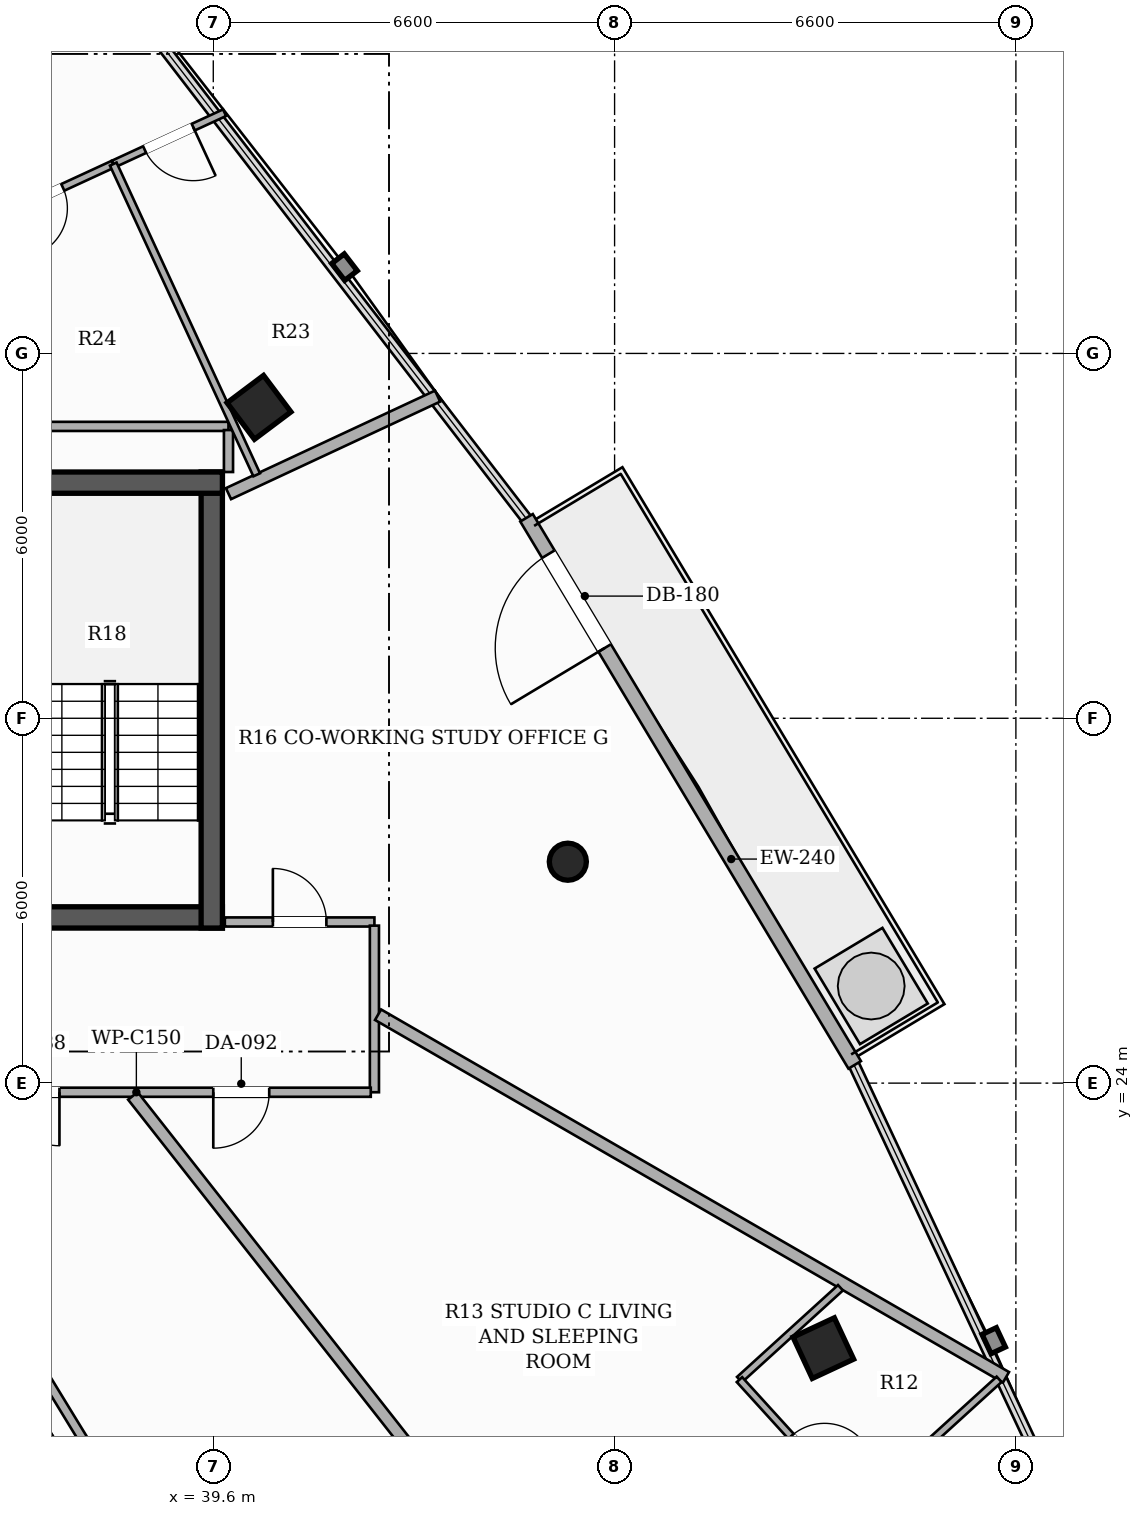
"""IFC4 building model, lengths in metres.
Left out: names, types, materials, properties, quantities, classifications, styles, units other than length and angle.
Written with IfcOpenShell. Run it as: python <this file> out.ifc"""

import sys

from ifc_helpers import new_model, si_unit, direction, frame, frame_2d, origin, origin_2d, place, context, subcontext, project, spatial, rectangle, hollow_rectangle, hollow_circle, extrude, element, fill, save


model = new_model("IFC4")
c1 = context("Model", 3, precision=1e-05, world=origin(), true_north=direction((0.0, 1.0)))
c2 = subcontext(c1, "Body", "Model", "MODEL_VIEW")
j1 = project(units=[si_unit("LENGTHUNIT", "METRE"), si_unit("PLANEANGLEUNIT", "RADIAN")], contexts=[c1])
p1 = place(None, origin())
s1 = spatial("IfcSite", under=j1, at=p1, CompositionType="ELEMENT")
p2 = place(p1, origin())
s2 = spatial("IfcBuilding", under=s1, at=p2, CompositionType="ELEMENT")
p3 = place(p2, frame((0.0, 0.0, 203.0)))
s3 = spatial("IfcBuildingStorey", under=s2, at=p3, CompositionType="ELEMENT", Elevation=203.0)
p4 = place(p3, frame((26.25, 26.725, 0.0), z_axis=(0.0, 0.0, 1.0), x_axis=(1.0, 0.0, 0.0)))
e1 = element("IfcWall", 1, at=p4, inside=s3, PredefinedType="SHEAR", context=c2, shape_type="SweptSolid", body=[
    extrude(rectangle(XDim=13.5, YDim=0.35, at=frame_2d((6.75, 0.0))), origin(), (0.0, 0.0, 1.0), 3.3),
])
p5 = place(p4, frame((4.35, 0.0, 0.0)))
e2 = element("IfcOpeningElement", 2, at=p5, cuts=e1, PredefinedType="OPENING", context=c2, shape_type="SweptSolid", body=[
    extrude(rectangle(XDim=1.05, YDim=2.15, at=frame_2d((0.525, 1.075))), frame((0.0, 0.185, 0.0), z_axis=(0.0, -1.0, 0.0), x_axis=(1.0, 0.0, 0.0)), (0.0, 0.0, 1.0), 0.37),
])
p6 = place(p4, frame((8.3, 0.0, 0.0)))
e3 = element("IfcOpeningElement", 3, at=p6, cuts=e1, PredefinedType="OPENING", context=c2, shape_type="SweptSolid", body=[
    extrude(rectangle(XDim=1.05, YDim=2.15, at=frame_2d((0.525, 1.075))), frame((0.0, 0.185, 0.0), z_axis=(0.0, -1.0, 0.0), x_axis=(1.0, 0.0, 0.0)), (0.0, 0.0, 1.0), 0.37),
])
p7 = place(p3, frame((39.575, 26.55, 0.0), z_axis=(0.0, 0.0, 1.0), x_axis=(0.0, 1.0, 0.0)))
e4 = element("IfcWall", 4, at=p7, inside=s3, PredefinedType="SHEAR", context=c2, shape_type="SweptSolid", body=[
    extrude(rectangle(XDim=7.5, YDim=0.35, at=frame_2d((3.75, 0.0))), origin(), (0.0, 0.0, 1.0), 3.3),
])
p8 = place(p3, frame((36.15, 33.875, 0.0), z_axis=(0.0, 0.0, 1.0), x_axis=(1.0, 0.0, 0.0)))
e5 = element("IfcWall", 5, at=p8, inside=s3, PredefinedType="SHEAR", context=c2, shape_type="SweptSolid", body=[
    extrude(rectangle(XDim=3.6, YDim=0.35, at=frame_2d((1.8, 0.0))), origin(), (0.0, 0.0, 1.0), 3.3),
])
p9 = place(p3, frame((49.633, 19.642, 0.0), z_axis=(0.0, 0.0, 1.0), x_axis=(-0.422618261741, 0.906307787037, 0.0)))
e6 = element("IfcColumn", 6, at=p9, inside=s3, PredefinedType="COLUMN", context=c2, shape_type="SweptSolid", body=[
    extrude(hollow_rectangle(XDim=0.75, YDim=0.75, WallThickness=0.025, at=origin_2d()), origin(), (0.0, 0.0, 1.0), 3.3),
])
p10 = place(p3, frame((45.431, 27.641, 0.0), z_axis=(0.0, 0.0, 1.0), x_axis=(1.0, 0.0, 0.0)))
e7 = element("IfcColumn", 7, at=p10, inside=s3, PredefinedType="COLUMN", context=c2, shape_type="SweptSolid", body=[
    extrude(hollow_circle(Radius=0.305, WallThickness=0.016, at=origin_2d()), origin(), (0.0, 0.0, 1.0), 3.3),
])
p11 = place(p3, frame((40.352, 35.113, 0.0), z_axis=(0.0, 0.0, 1.0), x_axis=(-0.600420225326, 0.799684658487, 0.0)))
e8 = element("IfcColumn", 8, at=p11, inside=s3, PredefinedType="COLUMN", context=c2, shape_type="SweptSolid", body=[
    extrude(hollow_rectangle(XDim=0.75, YDim=0.75, WallThickness=0.025, at=origin_2d()), origin(), (0.0, 0.0, 1.0), 3.3),
])
p12 = place(p3, frame((50.149, 24.3, 0.0), z_axis=(0.0, 0.0, 1.0), x_axis=(-0.514406779101, 0.857546305231, 0.0)))
e9 = element("IfcWall", 9, at=p12, inside=s3, PredefinedType="SOLIDWALL", context=c2, shape_type="SweptSolid", body=[
    extrude(rectangle(XDim=10.492, YDim=0.24, at=frame_2d((5.246, 0.0))), origin(), (0.0, 0.0, 1.0), 2.624),
])
p13 = place(p12, frame((7.994, 0.0, 0.0)))
e10 = element("IfcOpeningElement", 10, at=p13, cuts=e9, PredefinedType="OPENING", context=c2, shape_type="SweptSolid", body=[
    extrude(rectangle(XDim=1.8, YDim=2.2, at=frame_2d((0.9, 1.1))), frame((0.0, 0.13, 0.0), z_axis=(0.0, -1.0, 0.0), x_axis=(1.0, 0.0, 0.0)), (0.0, 0.0, 1.0), 0.26),
])
p14 = place(p3, frame((39.79, 26.65, 0.0), z_axis=(0.0, 0.0, 1.0), x_axis=(1.0, 0.0, 0.0)))
e11 = element("IfcWall", 11, at=p14, inside=s3, PredefinedType="PARTITIONING", context=c2, shape_type="SweptSolid", body=[
    extrude(rectangle(XDim=2.46, YDim=0.15, at=frame_2d((1.23, 0.0))), origin(), (0.0, 0.0, 1.0), 2.565),
])
p15 = place(p14, frame((0.79, 0.0, 0.0)))
e12 = element("IfcOpeningElement", 12, at=p15, cuts=e11, PredefinedType="OPENING", context=c2, shape_type="SweptSolid", body=[
    extrude(rectangle(XDim=0.88, YDim=2.1, at=frame_2d((0.44, 1.05))), frame((0.0, 0.085, 0.0), z_axis=(0.0, -1.0, 0.0), x_axis=(1.0, 0.0, 0.0)), (0.0, 0.0, 1.0), 0.17),
])
p16 = place(p3, frame((42.25, 26.59, 0.0), z_axis=(0.0, 0.0, 1.0), x_axis=(0.0, -1.0, 0.0)))
e13 = element("IfcWall", 13, at=p16, inside=s3, PredefinedType="PARTITIONING", context=c2, shape_type="SweptSolid", body=[
    extrude(rectangle(XDim=2.74, YDim=0.15, at=frame_2d((1.37, 0.0))), origin(), (0.0, 0.0, 1.0), 2.773),
])
p17 = place(p3, frame((42.19, 23.85, 0.0), z_axis=(0.0, 0.0, 1.0), x_axis=(-1.0, 0.0, 0.0)))
e14 = element("IfcWall", 14, at=p17, inside=s3, PredefinedType="PARTITIONING", context=c2, shape_type="SweptSolid", body=[
    extrude(rectangle(XDim=8.217, YDim=0.15, at=frame_2d((4.108, 0.0))), origin(), (0.0, 0.0, 1.0), 2.565),
])
p18 = place(p17, frame((1.67, 0.0, 0.0)))
e15 = element("IfcOpeningElement", 15, at=p18, cuts=e14, PredefinedType="OPENING", context=c2, shape_type="SweptSolid", body=[
    extrude(rectangle(XDim=0.92, YDim=2.15, at=frame_2d((0.46, 1.075))), frame((0.0, 0.085, 0.0), z_axis=(0.0, -1.0, 0.0), x_axis=(1.0, 0.0, 0.0)), (0.0, 0.0, 1.0), 0.17),
])
p19 = place(p17, frame((5.12, 0.0, 0.0)))
e16 = element("IfcOpeningElement", 16, at=p19, cuts=e14, PredefinedType="OPENING", context=c2, shape_type="SweptSolid", body=[
    extrude(rectangle(XDim=0.88, YDim=2.1, at=frame_2d((0.44, 1.05))), frame((0.0, 0.085, 0.0), z_axis=(0.0, -1.0, 0.0), x_axis=(1.0, 0.0, 0.0)), (0.0, 0.0, 1.0), 0.17),
])
p20 = place(p3, frame((36.31, 34.8, 0.0), z_axis=(0.0, 0.0, 1.0), x_axis=(1.0, 0.0, 0.0)))
e17 = element("IfcWall", 17, at=p20, inside=s3, PredefinedType="PARTITIONING", context=c2, shape_type="SweptSolid", body=[
    extrude(rectangle(XDim=3.54, YDim=0.15, at=frame_2d((1.77, 0.0))), origin(), (0.0, 0.0, 1.0), 2.425),
])
p21 = place(p3, frame((39.85, 34.74, 0.0), z_axis=(0.0, 0.0, 1.0), x_axis=(0.0, -1.0, 0.0)))
e18 = element("IfcWall", 18, at=p21, inside=s3, PredefinedType="PARTITIONING", context=c2, shape_type="SweptSolid", body=[
    extrude(rectangle(XDim=0.69, YDim=0.15, at=frame_2d((0.345, 0.0))), origin(), (0.0, 0.0, 1.0), 2.773),
])
p22 = place(p3, frame((34.01, 23.79, 0.0), z_axis=(0.0, 0.0, 1.0), x_axis=(0.521316137909, -0.853363629618, 0.0)))
e19 = element("IfcWall", 19, at=p22, inside=s3, PredefinedType="PARTITIONING", context=c2, shape_type="SweptSolid", body=[
    extrude(rectangle(XDim=7.746, YDim=0.15, at=frame_2d((3.873, 0.0))), origin(), (0.0, 0.0, 1.0), 2.773),
])
p23 = place(p3, frame((52.214, 6.073, 0.0), z_axis=(0.0, 0.0, 1.0), x_axis=(-0.618246700658, 0.785984107425, 0.0)))
e20 = element("IfcWall", 20, at=p23, inside=s3, PredefinedType="PARTITIONING", context=c2, shape_type="SweptSolid", body=[
    extrude(rectangle(XDim=22.541, YDim=0.2, at=frame_2d((11.271, 0.0))), origin(), (0.0, 0.0, 1.0), 2.492),
])
p24 = place(p3, frame((42.31, 25.125, 0.0), z_axis=(0.0, 0.0, 1.0), x_axis=(0.866001812803, -0.500040858552, 0.0)))
e21 = element("IfcWall", 21, at=p24, inside=s3, PredefinedType="PARTITIONING", context=c2, shape_type="SweptSolid", body=[
    extrude(rectangle(XDim=11.925, YDim=0.2, at=frame_2d((5.962, 0.0))), origin(), (0.0, 0.0, 1.0), 2.492),
])
p25 = place(p3, frame((43.289, 35.298, 0.0), z_axis=(0.0, 0.0, 1.0), x_axis=(-0.906268592738, -0.422702304011, 0.0)))
e22 = element("IfcWall", 22, at=p25, inside=s3, PredefinedType="PARTITIONING", context=c2, shape_type="SweptSolid", body=[
    extrude(rectangle(XDim=3.795, YDim=0.2, at=frame_2d((1.897, 0.0))), origin(), (0.0, 0.0, 1.0), 2.492),
])
p26 = place(p3, frame((49.915, 20.635, 0.0), z_axis=(0.0, 0.0, 1.0), x_axis=(-0.739748179987, -0.672883816276, 0.0)))
e23 = element("IfcWall", 23, at=p26, inside=s3, PredefinedType="PARTITIONING", context=c2, shape_type="SweptSolid", body=[
    extrude(rectangle(XDim=2.246, YDim=0.12, at=frame_2d((1.123, 0.0))), origin(), (0.0, 0.0, 1.0), 2.492),
])
p27 = place(p3, frame((48.254, 19.124, 0.0), z_axis=(0.0, 0.0, 1.0), x_axis=(0.672884473084, -0.739747582546, 0.0)))
e24 = element("IfcWall", 24, at=p27, inside=s3, PredefinedType="PARTITIONING", context=c2, shape_type="SweptSolid", body=[
    extrude(rectangle(XDim=2.87, YDim=0.12, at=frame_2d((1.435, 0.0))), origin(), (0.0, 0.0, 1.0), 2.492),
])
p28 = place(p27, frame((1.26, 0.0, 0.0)))
e25 = element("IfcOpeningElement", 25, at=p28, cuts=e24, PredefinedType="OPENING", context=c2, shape_type="SweptSolid", body=[
    extrude(rectangle(XDim=0.82, YDim=2.1, at=frame_2d((0.41, 1.05))), frame((0.0, 0.07, 0.0), z_axis=(0.0, -1.0, 0.0), x_axis=(1.0, 0.0, 0.0)), (0.0, 0.0, 1.0), 0.14),
])
p29 = place(p3, frame((52.524, 19.129, 0.0), z_axis=(0.0, 0.0, 1.0), x_axis=(-0.739674496232, -0.672964813065, 0.0)))
e26 = element("IfcWall", 26, at=p29, inside=s3, PredefinedType="PARTITIONING", context=c2, shape_type="SweptSolid", body=[
    extrude(rectangle(XDim=3.162, YDim=0.12, at=frame_2d((1.581, 0.0))), origin(), (0.0, 0.0, 1.0), 2.492),
])
p30 = place(p3, frame((37.955, 39.114, 0.0), z_axis=(0.0, 0.0, 1.0), x_axis=(-0.907945896046, -0.41908740121, 0.0)))
e27 = element("IfcWall", 27, at=p30, inside=s3, PredefinedType="PARTITIONING", context=c2, shape_type="SweptSolid", body=[
    extrude(rectangle(XDim=2.649, YDim=0.12, at=frame_2d((1.324, 0.0))), origin(), (0.0, 0.0, 1.0), 2.492),
])
p31 = place(p30, frame((0.914, 0.0, 0.0)))
e28 = element("IfcOpeningElement", 28, at=p31, cuts=e27, PredefinedType="OPENING", context=c2, shape_type="SweptSolid", body=[
    extrude(rectangle(XDim=0.82, YDim=2.1, at=frame_2d((0.41, 1.05))), frame((0.0, 0.07, 0.0), z_axis=(0.0, -1.0, 0.0), x_axis=(1.0, 0.0, 0.0)), (0.0, 0.0, 1.0), 0.14),
])
p32 = place(p3, frame((39.786, 39.959, 0.0), z_axis=(0.0, 0.0, 1.0), x_axis=(-0.90796292821, -0.419050499338, 0.0)))
e29 = element("IfcWall", 29, at=p32, inside=s3, PredefinedType="PARTITIONING", context=c2, shape_type="SweptSolid", body=[
    extrude(rectangle(XDim=2.016, YDim=0.12, at=frame_2d((1.008, 0.0))), origin(), (0.0, 0.0, 1.0), 3.06),
])
p33 = place(p32, frame((0.568, 0.0, 0.0)))
e30 = element("IfcOpeningElement", 30, at=p33, cuts=e29, PredefinedType="OPENING", context=c2, shape_type="SweptSolid", body=[
    extrude(rectangle(XDim=0.88, YDim=2.1, at=frame_2d((0.44, 1.05))), frame((0.0, 0.07, 0.0), z_axis=(0.0, -1.0, 0.0), x_axis=(1.0, 0.0, 0.0)), (0.0, 0.0, 1.0), 0.14),
])
p34 = place(p3, frame((37.955, 39.114, 0.0), z_axis=(0.0, 0.0, 1.0), x_axis=(0.41911319203, -0.907933991139, 0.0)))
e31 = element("IfcWall", 31, at=p34, inside=s3, PredefinedType="PARTITIONING", context=c2, shape_type="SweptSolid", body=[
    extrude(rectangle(XDim=5.628, YDim=0.12, at=frame_2d((2.814, 0.0))), origin(), (0.0, 0.0, 1.0), 2.492),
])
p35 = place(p13, origin())
e32 = element("IfcDoor", 32, at=p35, inside=s3, OperationType="SINGLE_SWING_LEFT", PredefinedType="DOOR", context=c2, shape_type="SweptSolid", body=[
    extrude(rectangle(XDim=1.8, YDim=2.2, at=frame_2d((0.9, 1.1))), frame((0.0, 0.025, 0.0), z_axis=(0.0, -1.0, 0.0), x_axis=(1.0, 0.0, 0.0)), (0.0, 0.0, 1.0), 0.05),
])
fill(e10, e32)
p36 = place(p18, origin())
e33 = element("IfcDoor", 33, at=p36, inside=s3, OperationType="SINGLE_SWING_RIGHT", PredefinedType="DOOR", context=c2, shape_type="SweptSolid", body=[
    extrude(rectangle(XDim=0.92, YDim=2.15, at=frame_2d((0.46, 1.075))), frame((0.0, 0.025, 0.0), z_axis=(0.0, -1.0, 0.0), x_axis=(1.0, 0.0, 0.0)), (0.0, 0.0, 1.0), 0.05),
])
fill(e15, e33)
p37 = place(p28, origin())
e34 = element("IfcDoor", 34, at=p37, inside=s3, OperationType="SINGLE_SWING_RIGHT", PredefinedType="DOOR", context=c2, shape_type="SweptSolid", body=[
    extrude(rectangle(XDim=0.82, YDim=2.1, at=frame_2d((0.41, 1.05))), frame((0.0, 0.025, 0.0), z_axis=(0.0, -1.0, 0.0), x_axis=(1.0, 0.0, 0.0)), (0.0, 0.0, 1.0), 0.05),
])
fill(e25, e34)
p38 = place(p19, origin())
e35 = element("IfcDoor", 35, at=p38, inside=s3, OperationType="SINGLE_SWING_LEFT", PredefinedType="DOOR", context=c2, shape_type="SweptSolid", body=[
    extrude(rectangle(XDim=0.88, YDim=2.1, at=frame_2d((0.44, 1.05))), frame((0.0, 0.025, 0.0), z_axis=(0.0, -1.0, 0.0), x_axis=(1.0, 0.0, 0.0)), (0.0, 0.0, 1.0), 0.05),
])
fill(e16, e35)
p39 = place(p31, origin())
e36 = element("IfcDoor", 36, at=p39, inside=s3, OperationType="SINGLE_SWING_RIGHT", PredefinedType="DOOR", context=c2, shape_type="SweptSolid", body=[
    extrude(rectangle(XDim=0.82, YDim=2.1, at=frame_2d((0.41, 1.05))), frame((0.0, 0.025, 0.0), z_axis=(0.0, -1.0, 0.0), x_axis=(1.0, 0.0, 0.0)), (0.0, 0.0, 1.0), 0.05),
])
fill(e28, e36)
p40 = place(p33, origin())
e37 = element("IfcDoor", 37, at=p40, inside=s3, OperationType="SINGLE_SWING_LEFT", PredefinedType="DOOR", context=c2, shape_type="SweptSolid", body=[
    extrude(rectangle(XDim=0.88, YDim=2.1, at=frame_2d((0.44, 1.05))), frame((0.0, 0.025, 0.0), z_axis=(0.0, -1.0, 0.0), x_axis=(1.0, 0.0, 0.0)), (0.0, 0.0, 1.0), 0.05),
])
fill(e30, e37)
p41 = place(p15, origin())
e38 = element("IfcDoor", 38, at=p41, inside=s3, OperationType="SINGLE_SWING_LEFT", PredefinedType="DOOR", context=c2, shape_type="SweptSolid", body=[
    extrude(rectangle(XDim=0.88, YDim=2.1, at=frame_2d((0.44, 1.05))), frame((0.0, 0.025, 0.0), z_axis=(0.0, -1.0, 0.0), x_axis=(1.0, 0.0, 0.0)), (0.0, 0.0, 1.0), 0.05),
])
fill(e12, e38)
save(model, sys.argv[1])
